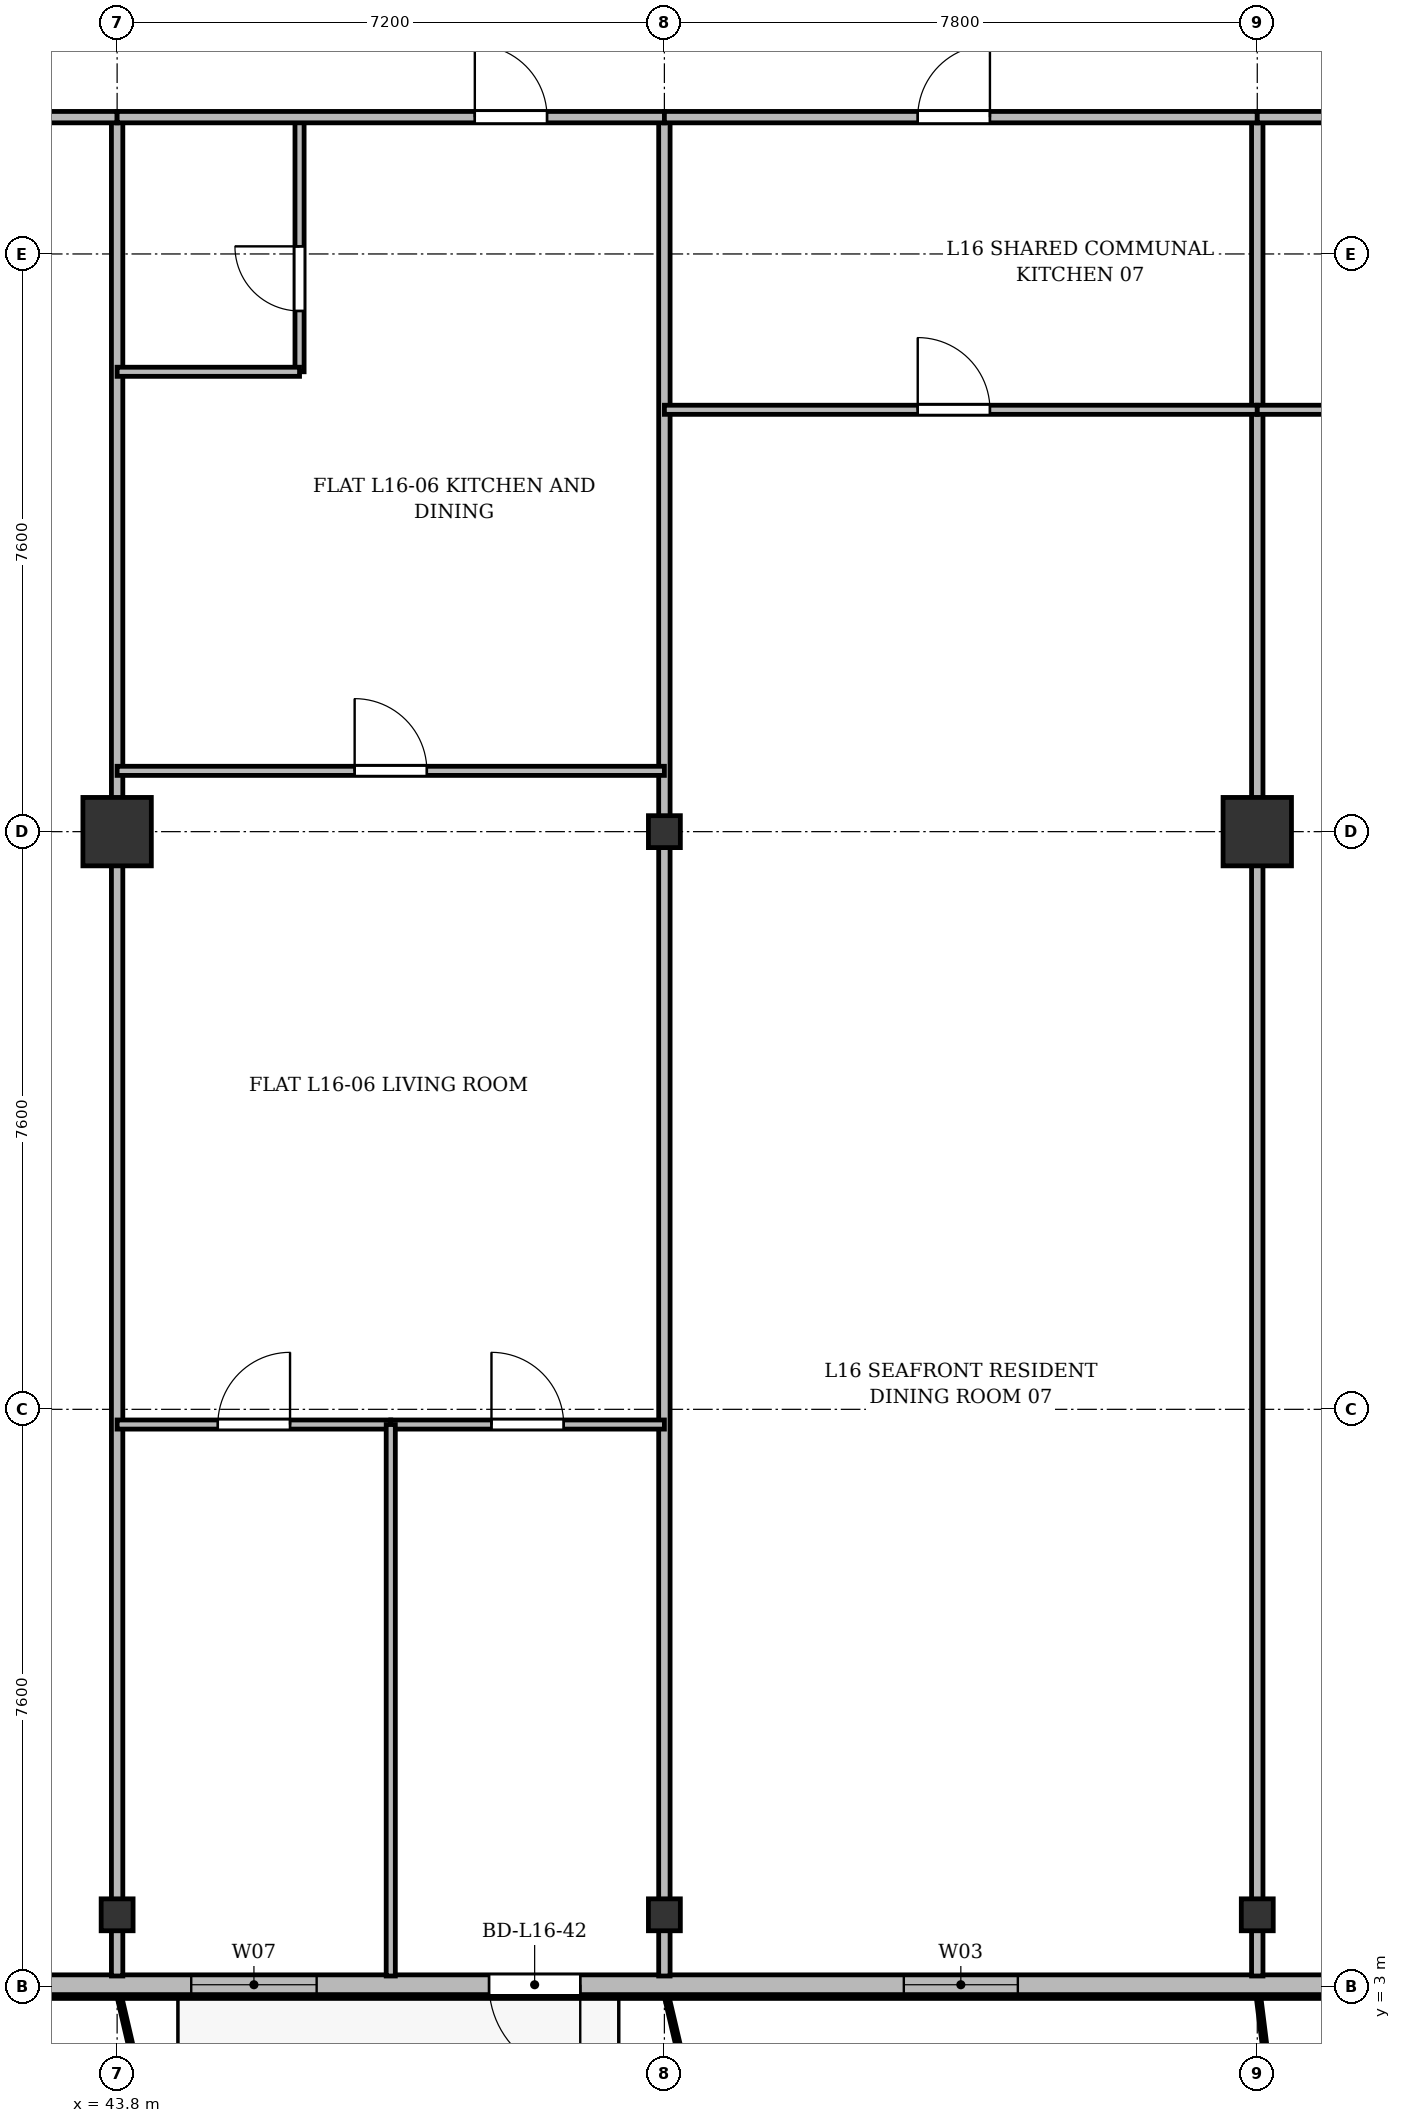
"""IFC4 building model, lengths in metres.
Left out: names, types, materials, properties, quantities, classifications, styles, units other than length and angle.
Written with IfcOpenShell. Run it as: python <this file> out.ifc"""

import sys

from ifc_helpers import new_model, si_unit, direction, frame, frame_2d, origin, origin_2d, place, context, subcontext, project, spatial, rectangle, i_section, extrude, source, transform, mapped, element, fill, save


model = new_model("IFC4")
c1 = context("Model", 3, precision=1e-05, world=origin(), true_north=direction((0.0, 1.0)))
c2 = subcontext(c1, "Body", "Model", "MODEL_VIEW")
j1 = project(units=[si_unit("LENGTHUNIT", "METRE"), si_unit("PLANEANGLEUNIT", "RADIAN")], contexts=[c1])
p1 = place(None, origin())
s1 = spatial("IfcSite", under=j1, at=p1, CompositionType="ELEMENT")
p2 = place(p1, origin())
s2 = spatial("IfcBuilding", under=s1, at=p2, CompositionType="ELEMENT")
p3 = place(p2, frame((0.0, 0.0, 63.1)))
s3 = spatial("IfcBuildingStorey", under=s2, at=p3, CompositionType="ELEMENT", Elevation=63.1)
m1 = source(origin(), c2, "Body", "SweptSolid", [
    extrude(i_section(OverallWidth=0.42, OverallDepth=0.42, WebThickness=0.026, FlangeThickness=0.04, at=origin_2d()), origin(), (0.0, 0.0, 1.0), 3.6),
])
p4 = place(p3, frame((43.8, 3.95, 0.0), z_axis=(0.0, 0.0, 1.0), x_axis=(1.0, 0.0, 0.0)))
e1 = element("IfcColumn", 1, at=p4, inside=s3, PredefinedType="COLUMN", context=c2, shape_type="MappedRepresentation", body=[
    mapped(m1, transform((0.0, 0.0, 0.0), x_axis=(1.0, 0.0, 0.0), y_axis=(0.0, 1.0, 0.0), z_axis=(0.0, 0.0, 1.0), scale=1.0)),
])
m2 = source(origin(), c2, "Body", "SweptSolid", [
    extrude(rectangle(XDim=0.9, YDim=0.9, at=origin_2d()), origin(), (0.0, 0.0, 1.0), 3.6),
])
p5 = place(p3, frame((43.8, 18.2, 0.0), z_axis=(0.0, 0.0, 1.0), x_axis=(1.0, 0.0, 0.0)))
e2 = element("IfcColumn", 2, at=p5, inside=s3, PredefinedType="COLUMN", context=c2, shape_type="MappedRepresentation", body=[
    mapped(m2, transform((0.0, 0.0, 0.0), x_axis=(1.0, 0.0, 0.0), y_axis=(0.0, 1.0, 0.0), z_axis=(0.0, 0.0, 1.0), scale=1.0)),
])
for number, where, z_axis, x_axis in (
    (3, (51.0, 3.95, 0.0), (0.0, 0.0, 1.0), (1.0, 0.0, 0.0)),
    (4, (51.0, 18.2, 0.0), (0.0, 0.0, 1.0), (1.0, 0.0, 0.0)),
    (5, (58.8, 3.95, 0.0), (0.0, 0.0, 1.0), (1.0, 0.0, 0.0)),
):
    element("IfcColumn", number, at=place(p3, frame(where, z_axis=z_axis, x_axis=x_axis)), inside=s3, PredefinedType="COLUMN", context=c2, shape_type="MappedRepresentation", body=[
        mapped(m1, transform((0.0, 0.0, 0.0), x_axis=(1.0, 0.0, 0.0), y_axis=(0.0, 1.0, 0.0), z_axis=(0.0, 0.0, 1.0), scale=1.0)),
    ])
p6 = place(p3, frame((58.8, 18.2, 0.0), z_axis=(0.0, 0.0, 1.0), x_axis=(1.0, 0.0, 0.0)))
e6 = element("IfcColumn", 6, at=p6, inside=s3, PredefinedType="COLUMN", context=c2, shape_type="MappedRepresentation", body=[
    mapped(m2, transform((0.0, 0.0, 0.0), x_axis=(1.0, 0.0, 0.0), y_axis=(0.0, 1.0, 0.0), z_axis=(0.0, 0.0, 1.0), scale=1.0)),
])
p7 = place(p3, frame((66.9, 3.03, 0.0), z_axis=(0.0, 0.0, 1.0), x_axis=(-1.0, 0.0, 0.0)))
e7 = element("IfcWall", 7, at=p7, inside=s3, PredefinedType="SOLIDWALL", context=c2, shape_type="SweptSolid", body=[
    extrude(rectangle(XDim=37.3, YDim=0.26, at=frame_2d((18.65, 0.0))), origin(), (0.0, 0.0, 1.0), 3.34),
])
p8 = place(p7, frame((2.995, 0.0, 0.9)))
e8 = element("IfcOpeningElement", 8, at=p8, cuts=e7, PredefinedType="OPENING", context=c2, shape_type="SweptSolid", body=[
    extrude(rectangle(XDim=2.2, YDim=1.8, at=frame_2d((1.1, 0.9))), frame((0.0, 0.14, 0.0), z_axis=(0.0, -1.0, 0.0), x_axis=(1.0, 0.0, 0.0)), (0.0, 0.0, 1.0), 0.28),
])
p9 = place(p7, frame((11.25, 0.0, 0.9)))
e9 = element("IfcOpeningElement", 9, at=p9, cuts=e7, PredefinedType="OPENING", context=c2, shape_type="SweptSolid", body=[
    extrude(rectangle(XDim=1.5, YDim=1.75, at=frame_2d((0.75, 0.875))), frame((0.0, 0.14, 0.0), z_axis=(0.0, -1.0, 0.0), x_axis=(1.0, 0.0, 0.0)), (0.0, 0.0, 1.0), 0.28),
])
p10 = place(p7, frame((17.007, 0.0, 0.0)))
e10 = element("IfcOpeningElement", 10, at=p10, cuts=e7, PredefinedType="OPENING", context=c2, shape_type="SweptSolid", body=[
    extrude(rectangle(XDim=1.2, YDim=2.2, at=frame_2d((0.6, 1.1))), frame((0.0, 0.14, 0.0), z_axis=(0.0, -1.0, 0.0), x_axis=(1.0, 0.0, 0.0)), (0.0, 0.0, 1.0), 0.28),
])
p11 = place(p7, frame((20.475, 0.0, 0.9)))
e11 = element("IfcOpeningElement", 11, at=p11, cuts=e7, PredefinedType="OPENING", context=c2, shape_type="SweptSolid", body=[
    extrude(rectangle(XDim=1.65, YDim=1.85, at=frame_2d((0.825, 0.925))), frame((0.0, 0.14, 0.0), z_axis=(0.0, -1.0, 0.0), x_axis=(1.0, 0.0, 0.0)), (0.0, 0.0, 1.0), 0.28),
])
p12 = place(p7, frame((28.8, 0.0, 0.9)))
e12 = element("IfcOpeningElement", 12, at=p12, cuts=e7, PredefinedType="OPENING", context=c2, shape_type="SweptSolid", body=[
    extrude(rectangle(XDim=1.8, YDim=1.8, at=frame_2d((0.9, 0.9))), frame((0.0, 0.14, 0.0), z_axis=(0.0, -1.0, 0.0), x_axis=(1.0, 0.0, 0.0)), (0.0, 0.0, 1.0), 0.28),
])
for number, where, z_axis, x_axis in (
    (13, (43.8, 3.145, 0.0), (0.0, 0.0, 1.0), (0.0, 1.0, 0.0)),
    (14, (51.0, 3.145, 0.0), (0.0, 0.0, 1.0), (0.0, 1.0, 0.0)),
    (15, (58.8, 3.145, 0.0), (0.0, 0.0, 1.0), (0.0, 1.0, 0.0)),
):
    element("IfcWall", number, at=place(p3, frame(where, z_axis=z_axis, x_axis=x_axis)), inside=s3, PredefinedType="PARTITIONING", context=c2, shape_type="SweptSolid", body=[
        extrude(rectangle(XDim=24.455, YDim=0.15, at=frame_2d((12.228, 0.0))), origin(), (0.0, 0.0, 1.0), 2.752),
    ])
p13 = place(p3, frame((30.6, 27.6, 0.0), z_axis=(0.0, 0.0, 1.0), x_axis=(1.0, 0.0, 0.0)))
e16 = element("IfcWall", 16, at=p13, inside=s3, PredefinedType="PARTITIONING", context=c2, shape_type="SweptSolid", body=[
    extrude(rectangle(XDim=13.2, YDim=0.15, at=frame_2d((6.6, 0.0))), origin(), (0.0, 0.0, 1.0), 2.752),
])
p14 = place(p13, frame((5.8, 0.0, 0.0)))
e17 = element("IfcOpeningElement", 17, at=p14, cuts=e16, PredefinedType="OPENING", context=c2, shape_type="SweptSolid", body=[
    extrude(rectangle(XDim=1.6, YDim=2.2, at=frame_2d((0.8, 1.1))), frame((0.0, 0.085, 0.0), z_axis=(0.0, -1.0, 0.0), x_axis=(1.0, 0.0, 0.0)), (0.0, 0.0, 1.0), 0.17),
])
p15 = place(p3, frame((43.8, 19.0, 0.0), z_axis=(0.0, 0.0, 1.0), x_axis=(1.0, 0.0, 0.0)))
e18 = element("IfcWall", 18, at=p15, inside=s3, PredefinedType="PARTITIONING", context=c2, shape_type="SweptSolid", body=[
    extrude(rectangle(XDim=7.2, YDim=0.12, at=frame_2d((3.6, 0.0))), origin(), (0.0, 0.0, 1.0), 2.752),
])
p16 = place(p15, frame((3.125, 0.0, 0.0)))
e19 = element("IfcOpeningElement", 19, at=p16, cuts=e18, PredefinedType="OPENING", context=c2, shape_type="SweptSolid", body=[
    extrude(rectangle(XDim=0.95, YDim=2.15, at=frame_2d((0.475, 1.075))), frame((0.0, 0.07, 0.0), z_axis=(0.0, -1.0, 0.0), x_axis=(1.0, 0.0, 0.0)), (0.0, 0.0, 1.0), 0.14),
])
p17 = place(p3, frame((46.2, 24.25, 0.0), z_axis=(0.0, 0.0, 1.0), x_axis=(0.0, 1.0, 0.0)))
e20 = element("IfcWall", 20, at=p17, inside=s3, PredefinedType="PARTITIONING", context=c2, shape_type="SweptSolid", body=[
    extrude(rectangle(XDim=3.35, YDim=0.12, at=frame_2d((1.675, 0.0))), origin(), (0.0, 0.0, 1.0), 2.94),
])
p18 = place(p17, frame((0.8, 0.0, 0.0)))
e21 = element("IfcOpeningElement", 21, at=p18, cuts=e20, PredefinedType="OPENING", context=c2, shape_type="SweptSolid", body=[
    extrude(rectangle(XDim=0.85, YDim=2.1, at=frame_2d((0.425, 1.05))), frame((0.0, 0.07, 0.0), z_axis=(0.0, -1.0, 0.0), x_axis=(1.0, 0.0, 0.0)), (0.0, 0.0, 1.0), 0.14),
])
p19 = place(p3, frame((43.8, 24.25, 0.0), z_axis=(0.0, 0.0, 1.0), x_axis=(1.0, 0.0, 0.0)))
e22 = element("IfcWall", 22, at=p19, inside=s3, PredefinedType="PARTITIONING", context=c2, shape_type="SweptSolid", body=[
    extrude(rectangle(XDim=2.4, YDim=0.12, at=frame_2d((1.2, 0.0))), origin(), (0.0, 0.0, 1.0), 2.752),
])
p20 = place(p3, frame((43.8, 27.6, 0.0), z_axis=(0.0, 0.0, 1.0), x_axis=(1.0, 0.0, 0.0)))
e23 = element("IfcWall", 23, at=p20, inside=s3, PredefinedType="PARTITIONING", context=c2, shape_type="SweptSolid", body=[
    extrude(rectangle(XDim=7.2, YDim=0.15, at=frame_2d((3.6, 0.0))), origin(), (0.0, 0.0, 1.0), 2.752),
])
p21 = place(p20, frame((4.706, 0.0, 0.0)))
e24 = element("IfcOpeningElement", 24, at=p21, cuts=e23, PredefinedType="OPENING", context=c2, shape_type="SweptSolid", body=[
    extrude(rectangle(XDim=0.95, YDim=2.15, at=frame_2d((0.475, 1.075))), frame((0.0, 0.085, 0.0), z_axis=(0.0, -1.0, 0.0), x_axis=(1.0, 0.0, 0.0)), (0.0, 0.0, 1.0), 0.17),
])
p22 = place(p3, frame((43.8, 10.4, 0.0), z_axis=(0.0, 0.0, 1.0), x_axis=(1.0, 0.0, 0.0)))
e25 = element("IfcWall", 25, at=p22, inside=s3, PredefinedType="PARTITIONING", context=c2, shape_type="SweptSolid", body=[
    extrude(rectangle(XDim=3.6, YDim=0.12, at=frame_2d((1.8, 0.0))), origin(), (0.0, 0.0, 1.0), 2.752),
])
p23 = place(p22, frame((1.325, 0.0, 0.0)))
e26 = element("IfcOpeningElement", 26, at=p23, cuts=e25, PredefinedType="OPENING", context=c2, shape_type="SweptSolid", body=[
    extrude(rectangle(XDim=0.95, YDim=2.15, at=frame_2d((0.475, 1.075))), frame((0.0, 0.07, 0.0), z_axis=(0.0, -1.0, 0.0), x_axis=(1.0, 0.0, 0.0)), (0.0, 0.0, 1.0), 0.14),
])
p24 = place(p3, frame((47.4, 10.4, 0.0), z_axis=(0.0, 0.0, 1.0), x_axis=(1.0, 0.0, 0.0)))
e27 = element("IfcWall", 27, at=p24, inside=s3, PredefinedType="PARTITIONING", context=c2, shape_type="SweptSolid", body=[
    extrude(rectangle(XDim=3.6, YDim=0.12, at=frame_2d((1.8, 0.0))), origin(), (0.0, 0.0, 1.0), 2.752),
])
p25 = place(p24, frame((1.325, 0.0, 0.0)))
e28 = element("IfcOpeningElement", 28, at=p25, cuts=e27, PredefinedType="OPENING", context=c2, shape_type="SweptSolid", body=[
    extrude(rectangle(XDim=0.95, YDim=2.15, at=frame_2d((0.475, 1.075))), frame((0.0, 0.07, 0.0), z_axis=(0.0, -1.0, 0.0), x_axis=(1.0, 0.0, 0.0)), (0.0, 0.0, 1.0), 0.14),
])
p26 = place(p3, frame((47.4, 3.145, 0.0), z_axis=(0.0, 0.0, 1.0), x_axis=(0.0, 1.0, 0.0)))
e29 = element("IfcWall", 29, at=p26, inside=s3, PredefinedType="PARTITIONING", context=c2, shape_type="SweptSolid", body=[
    extrude(rectangle(XDim=7.255, YDim=0.12, at=frame_2d((3.627, 0.0))), origin(), (0.0, 0.0, 1.0), 2.69),
])
p27 = place(p3, frame((51.0, 27.6, 0.0), z_axis=(0.0, 0.0, 1.0), x_axis=(1.0, 0.0, 0.0)))
e30 = element("IfcWall", 30, at=p27, inside=s3, PredefinedType="PARTITIONING", context=c2, shape_type="SweptSolid", body=[
    extrude(rectangle(XDim=7.8, YDim=0.15, at=frame_2d((3.9, 0.0))), origin(), (0.0, 0.0, 1.0), 2.752),
])
p28 = place(p27, frame((3.333, 0.0, 0.0)))
e31 = element("IfcOpeningElement", 31, at=p28, cuts=e30, PredefinedType="OPENING", context=c2, shape_type="SweptSolid", body=[
    extrude(rectangle(XDim=0.95, YDim=2.15, at=frame_2d((0.475, 1.075))), frame((0.0, 0.085, 0.0), z_axis=(0.0, -1.0, 0.0), x_axis=(1.0, 0.0, 0.0)), (0.0, 0.0, 1.0), 0.17),
])
p29 = place(p3, frame((51.0, 23.75, 0.0), z_axis=(0.0, 0.0, 1.0), x_axis=(1.0, 0.0, 0.0)))
e32 = element("IfcWall", 32, at=p29, inside=s3, PredefinedType="PARTITIONING", context=c2, shape_type="SweptSolid", body=[
    extrude(rectangle(XDim=7.8, YDim=0.12, at=frame_2d((3.9, 0.0))), origin(), (0.0, 0.0, 1.0), 2.752),
])
p30 = place(p29, frame((3.333, 0.0, 0.0)))
e33 = element("IfcOpeningElement", 33, at=p30, cuts=e32, PredefinedType="OPENING", context=c2, shape_type="SweptSolid", body=[
    extrude(rectangle(XDim=0.95, YDim=2.15, at=frame_2d((0.475, 1.075))), frame((0.0, 0.07, 0.0), z_axis=(0.0, -1.0, 0.0), x_axis=(1.0, 0.0, 0.0)), (0.0, 0.0, 1.0), 0.14),
])
p31 = place(p3, frame((58.8, 27.6, 0.0), z_axis=(0.0, 0.0, 1.0), x_axis=(1.0, 0.0, 0.0)))
e34 = element("IfcWall", 34, at=p31, inside=s3, PredefinedType="PARTITIONING", context=c2, shape_type="SweptSolid", body=[
    extrude(rectangle(XDim=10.855, YDim=0.15, at=frame_2d((5.427, 0.0))), origin(), (0.0, 0.0, 1.0), 2.752),
])
p32 = place(p31, frame((4.953, 0.0, 0.0)))
e35 = element("IfcOpeningElement", 35, at=p32, cuts=e34, PredefinedType="OPENING", context=c2, shape_type="SweptSolid", body=[
    extrude(rectangle(XDim=0.95, YDim=2.15, at=frame_2d((0.475, 1.075))), frame((0.0, 0.085, 0.0), z_axis=(0.0, -1.0, 0.0), x_axis=(1.0, 0.0, 0.0)), (0.0, 0.0, 1.0), 0.17),
])
p33 = place(p3, frame((58.8, 23.75, 0.0), z_axis=(0.0, 0.0, 1.0), x_axis=(1.0, 0.0, 0.0)))
e36 = element("IfcWall", 36, at=p33, inside=s3, PredefinedType="PARTITIONING", context=c2, shape_type="SweptSolid", body=[
    extrude(rectangle(XDim=10.855, YDim=0.12, at=frame_2d((5.427, 0.0))), origin(), (0.0, 0.0, 1.0), 2.752),
])
p34 = place(p33, frame((4.953, 0.0, 0.0)))
e37 = element("IfcOpeningElement", 37, at=p34, cuts=e36, PredefinedType="OPENING", context=c2, shape_type="SweptSolid", body=[
    extrude(rectangle(XDim=0.95, YDim=2.15, at=frame_2d((0.475, 1.075))), frame((0.0, 0.07, 0.0), z_axis=(0.0, -1.0, 0.0), x_axis=(1.0, 0.0, 0.0)), (0.0, 0.0, 1.0), 0.14),
])
m3 = source(origin(), c2, "Body", "SweptSolid", [
    extrude(rectangle(XDim=1.5, YDim=1.75, at=frame_2d((0.75, 0.875))), frame((0.0, 0.03, 0.0), z_axis=(0.0, -1.0, 0.0), x_axis=(1.0, 0.0, 0.0)), (0.0, 0.0, 1.0), 0.06),
])
p35 = place(p9, origin())
e38 = element("IfcWindow", 38, at=p35, inside=s3, PartitioningType="SINGLE_PANEL", PredefinedType="WINDOW", context=c2, shape_type="MappedRepresentation", body=[
    mapped(m3, transform((0.0, 0.0, 0.0), x_axis=(1.0, 0.0, 0.0), y_axis=(0.0, 1.0, 0.0), z_axis=(0.0, 0.0, 1.0), scale=1.0)),
])
fill(e9, e38)
m4 = source(origin(), c2, "Body", "SweptSolid", [
    extrude(rectangle(XDim=1.2, YDim=2.2, at=frame_2d((0.6, 1.1))), frame((0.0, 0.025, 0.0), z_axis=(0.0, -1.0, 0.0), x_axis=(1.0, 0.0, 0.0)), (0.0, 0.0, 1.0), 0.05),
])
p36 = place(p10, origin())
e39 = element("IfcDoor", 39, at=p36, inside=s3, OperationType="SINGLE_SWING_LEFT", PredefinedType="DOOR", context=c2, shape_type="MappedRepresentation", body=[
    mapped(m4, transform((0.0, 0.0, 0.0), x_axis=(1.0, 0.0, 0.0), y_axis=(0.0, 1.0, 0.0), z_axis=(0.0, 0.0, 1.0), scale=1.0)),
])
fill(e10, e39)
m5 = source(origin(), c2, "Body", "SweptSolid", [
    extrude(rectangle(XDim=1.65, YDim=1.85, at=frame_2d((0.825, 0.925))), frame((0.0, 0.03, 0.0), z_axis=(0.0, -1.0, 0.0), x_axis=(1.0, 0.0, 0.0)), (0.0, 0.0, 1.0), 0.06),
])
p37 = place(p11, origin())
e40 = element("IfcWindow", 40, at=p37, inside=s3, PartitioningType="SINGLE_PANEL", PredefinedType="WINDOW", context=c2, shape_type="MappedRepresentation", body=[
    mapped(m5, transform((0.0, 0.0, 0.0), x_axis=(1.0, 0.0, 0.0), y_axis=(0.0, 1.0, 0.0), z_axis=(0.0, 0.0, 1.0), scale=1.0)),
])
fill(e11, e40)
m6 = source(origin(), c2, "Body", "SweptSolid", [
    extrude(rectangle(XDim=0.95, YDim=2.15, at=frame_2d((0.475, 1.075))), frame((0.0, 0.025, 0.0), z_axis=(0.0, -1.0, 0.0), x_axis=(1.0, 0.0, 0.0)), (0.0, 0.0, 1.0), 0.05),
])
p38 = place(p16, origin())
e41 = element("IfcDoor", 41, at=p38, inside=s3, OperationType="SINGLE_SWING_LEFT", PredefinedType="DOOR", context=c2, shape_type="MappedRepresentation", body=[
    mapped(m6, transform((0.0, 0.0, 0.0), x_axis=(1.0, 0.0, 0.0), y_axis=(0.0, 1.0, 0.0), z_axis=(0.0, 0.0, 1.0), scale=1.0)),
])
fill(e19, e41)
m7 = source(origin(), c2, "Body", "SweptSolid", [
    extrude(rectangle(XDim=0.85, YDim=2.1, at=frame_2d((0.425, 1.05))), frame((0.0, 0.025, 0.0), z_axis=(0.0, -1.0, 0.0), x_axis=(1.0, 0.0, 0.0)), (0.0, 0.0, 1.0), 0.05),
])
p39 = place(p18, origin())
e42 = element("IfcDoor", 42, at=p39, inside=s3, OperationType="SINGLE_SWING_RIGHT", PredefinedType="DOOR", context=c2, shape_type="MappedRepresentation", body=[
    mapped(m7, transform((0.0, 0.0, 0.0), x_axis=(1.0, 0.0, 0.0), y_axis=(0.0, 1.0, 0.0), z_axis=(0.0, 0.0, 1.0), scale=1.0)),
])
fill(e21, e42)
p40 = place(p21, origin())
e43 = element("IfcDoor", 43, at=p40, inside=s3, OperationType="SINGLE_SWING_LEFT", PredefinedType="DOOR", context=c2, shape_type="MappedRepresentation", body=[
    mapped(m6, transform((0.0, 0.0, 0.0), x_axis=(1.0, 0.0, 0.0), y_axis=(0.0, 1.0, 0.0), z_axis=(0.0, 0.0, 1.0), scale=1.0)),
])
fill(e24, e43)
p41 = place(p23, origin())
e44 = element("IfcDoor", 44, at=p41, inside=s3, OperationType="SINGLE_SWING_RIGHT", PredefinedType="DOOR", context=c2, shape_type="MappedRepresentation", body=[
    mapped(m6, transform((0.0, 0.0, 0.0), x_axis=(1.0, 0.0, 0.0), y_axis=(0.0, 1.0, 0.0), z_axis=(0.0, 0.0, 1.0), scale=1.0)),
])
fill(e26, e44)
p42 = place(p25, origin())
e45 = element("IfcDoor", 45, at=p42, inside=s3, OperationType="SINGLE_SWING_LEFT", PredefinedType="DOOR", context=c2, shape_type="MappedRepresentation", body=[
    mapped(m6, transform((0.0, 0.0, 0.0), x_axis=(1.0, 0.0, 0.0), y_axis=(0.0, 1.0, 0.0), z_axis=(0.0, 0.0, 1.0), scale=1.0)),
])
fill(e28, e45)
p43 = place(p28, origin())
e46 = element("IfcDoor", 46, at=p43, inside=s3, OperationType="SINGLE_SWING_RIGHT", PredefinedType="DOOR", context=c2, shape_type="MappedRepresentation", body=[
    mapped(m6, transform((0.0, 0.0, 0.0), x_axis=(1.0, 0.0, 0.0), y_axis=(0.0, 1.0, 0.0), z_axis=(0.0, 0.0, 1.0), scale=1.0)),
])
fill(e31, e46)
p44 = place(p30, origin())
e47 = element("IfcDoor", 47, at=p44, inside=s3, OperationType="SINGLE_SWING_LEFT", PredefinedType="DOOR", context=c2, shape_type="MappedRepresentation", body=[
    mapped(m6, transform((0.0, 0.0, 0.0), x_axis=(1.0, 0.0, 0.0), y_axis=(0.0, 1.0, 0.0), z_axis=(0.0, 0.0, 1.0), scale=1.0)),
])
fill(e33, e47)
save(model, sys.argv[1])
